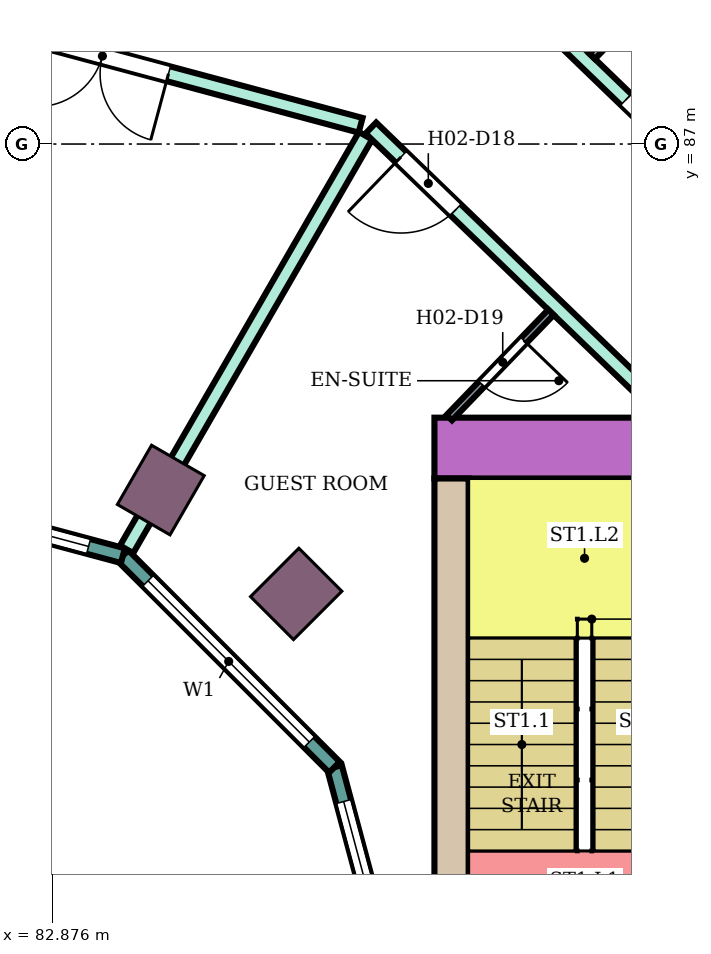
"""IFC4 building model, lengths in metres.
Left out: names, types, materials, properties, quantities, classifications, styles, units other than length and angle.
Written with IfcOpenShell. Run it as: python <this file> out.ifc"""

import sys

from ifc_helpers import new_model, si_unit, direction, frame, frame_2d, origin, origin_2d, place, context, subcontext, project, spatial, rectangle, extrude, element, fill, save


model = new_model("IFC4")
c1 = context("Model", 3, precision=1e-05, world=origin(), true_north=direction((0.0, 1.0)))
c2 = subcontext(c1, "Body", "Model", "MODEL_VIEW")
j1 = project(units=[si_unit("LENGTHUNIT", "METRE"), si_unit("PLANEANGLEUNIT", "RADIAN")], contexts=[c1])
p1 = place(None, origin())
s1 = spatial("IfcSite", under=j1, at=p1, CompositionType="ELEMENT")
p2 = place(p1, origin())
s2 = spatial("IfcBuilding", under=s1, at=p2, CompositionType="ELEMENT")
p3 = place(p2, frame((0.0, 0.0, 40.2)))
s3 = spatial("IfcBuildingStorey", under=s2, at=p3, CompositionType="ELEMENT", Elevation=40.2)
for number, where, z_axis, x_axis in (
    (1, (86.081, 81.081, 0.0), (0.0, 0.0, 1.0), (0.707, 0.707, 0.0)),
    (2, (84.3, 82.448, 0.0), (0.0, 0.0, 1.0), (0.5, 0.866, 0.0)),
):
    element("IfcColumn", number, at=place(p3, frame(where, z_axis=z_axis, x_axis=x_axis)), inside=s3, PredefinedType="COLUMN", context=c2, shape_type="SweptSolid", body=[
        extrude(rectangle(XDim=0.9, YDim=0.8, at=origin_2d()), origin(), (0.0, 0.0, 1.0), 3.8),
    ])
p4 = place(p3, frame((87.9, 83.0, 0.0), z_axis=(0.0, 0.0, 1.0), x_axis=(1.0, 0.0, 0.0)))
e3 = element("IfcWall", 3, at=p4, inside=s3, PredefinedType="SHEAR", context=c2, shape_type="SweptSolid", body=[
    extrude(rectangle(XDim=14.7, YDim=0.8, at=frame_2d((7.35, 0.0))), origin(), (0.0, 0.0, 1.0), 3.48),
])
p5 = place(p4, frame((4.2, 0.0, 0.0)))
e4 = element("IfcOpeningElement", 4, at=p5, cuts=e3, PredefinedType="OPENING", context=c2, shape_type="SweptSolid", body=[
    extrude(rectangle(XDim=2.4, YDim=2.4, at=frame_2d((1.2, 1.2))), frame((0.0, 0.41, 0.0), z_axis=(0.0, -1.0, 0.0), x_axis=(1.0, 0.0, 0.0)), (0.0, 0.0, 1.0), 0.82),
])
p6 = place(p3, frame((88.125, 75.0, 0.0), z_axis=(0.0, 0.0, 1.0), x_axis=(0.0, 1.0, 0.0)))
e5 = element("IfcWall", 5, at=p6, inside=s3, PredefinedType="SHEAR", context=c2, shape_type="SweptSolid", body=[
    extrude(rectangle(XDim=7.6, YDim=0.45, at=frame_2d((3.8, 0.0))), origin(), (0.0, 0.0, 1.0), 3.48),
])
p7 = place(p3, frame((87.604, 75.0, 0.0), z_axis=(0.0, 0.0, 1.0), x_axis=(-0.258789828301, 0.965933654434, 0.0)))
e6 = element("IfcWall", 6, at=p7, inside=s3, PredefinedType="NOTDEFINED", context=c2, shape_type="SweptSolid", body=[
    extrude(rectangle(XDim=3.936, YDim=0.2, at=frame_2d((1.968, 0.0))), origin(), (0.0, 0.0, 1.0), 3.8),
])
p8 = place(p7, frame((0.468, 0.0, 0.9)))
e7 = element("IfcOpeningElement", 7, at=p8, cuts=e6, PredefinedType="OPENING", context=c2, shape_type="SweptSolid", body=[
    extrude(rectangle(XDim=3.0, YDim=2.3, at=frame_2d((1.5, 1.15))), frame((0.0, 0.11, 0.0), z_axis=(0.0, -1.0, 0.0), x_axis=(1.0, 0.0, 0.0)), (0.0, 0.0, 1.0), 0.22),
])
p9 = place(p3, frame((86.585, 78.802, 0.0), z_axis=(0.0, 0.0, 1.0), x_axis=(-0.707106781187, 0.707106781187, 0.0)))
e8 = element("IfcWall", 8, at=p9, inside=s3, PredefinedType="NOTDEFINED", context=c2, shape_type="SweptSolid", body=[
    extrude(rectangle(XDim=3.936, YDim=0.2, at=frame_2d((1.968, 0.0))), origin(), (0.0, 0.0, 1.0), 3.8),
])
p10 = place(p9, frame((0.468, 0.0, 0.9)))
e9 = element("IfcOpeningElement", 9, at=p10, cuts=e8, PredefinedType="OPENING", context=c2, shape_type="SweptSolid", body=[
    extrude(rectangle(XDim=3.0, YDim=2.3, at=frame_2d((1.5, 1.15))), frame((0.0, 0.11, 0.0), z_axis=(0.0, -1.0, 0.0), x_axis=(1.0, 0.0, 0.0)), (0.0, 0.0, 1.0), 0.22),
])
p11 = place(p3, frame((83.802, 81.585, 0.0), z_axis=(0.0, 0.0, 1.0), x_axis=(-0.965933654434, 0.258789828301, 0.0)))
e10 = element("IfcWall", 10, at=p11, inside=s3, PredefinedType="NOTDEFINED", context=c2, shape_type="SweptSolid", body=[
    extrude(rectangle(XDim=3.936, YDim=0.2, at=frame_2d((1.968, 0.0))), origin(), (0.0, 0.0, 1.0), 3.8),
])
p12 = place(p11, frame((0.468, 0.0, 0.9)))
e11 = element("IfcOpeningElement", 11, at=p12, cuts=e10, PredefinedType="OPENING", context=c2, shape_type="SweptSolid", body=[
    extrude(rectangle(XDim=3.0, YDim=2.3, at=frame_2d((1.5, 1.15))), frame((0.0, 0.11, 0.0), z_axis=(0.0, -1.0, 0.0), x_axis=(1.0, 0.0, 0.0)), (0.0, 0.0, 1.0), 0.22),
])
p13 = place(p3, frame((80.0, 89.104, 0.0), z_axis=(0.0, 0.0, 1.0), x_axis=(0.965886659739, -0.258965172444, 0.0)))
e12 = element("IfcWall", 12, at=p13, inside=s3, PredefinedType="PARTITIONING", context=c2, shape_type="SweptSolid", body=[
    extrude(rectangle(XDim=7.173, YDim=0.2, at=frame_2d((3.587, 0.0))), origin(), (0.0, 0.0, 1.0), 3.35),
])
p14 = place(p13, frame((2.757, 0.0, 0.0)))
e13 = element("IfcOpeningElement", 13, at=p14, cuts=e12, PredefinedType="OPENING", context=c2, shape_type="SweptSolid", body=[
    extrude(rectangle(XDim=1.8, YDim=2.1, at=frame_2d((0.9, 1.05))), frame((0.0, 0.11, 0.0), z_axis=(0.0, -1.0, 0.0), x_axis=(1.0, 0.0, 0.0)), (0.0, 0.0, 1.0), 0.22),
])
p15 = place(p3, frame((83.85, 81.668, 0.0), z_axis=(0.0, 0.0, 1.0), x_axis=(0.500233583443, 0.865890502313, 0.0)))
e14 = element("IfcWall", 14, at=p15, inside=s3, PredefinedType="PARTITIONING", context=c2, shape_type="SweptSolid", body=[
    extrude(rectangle(XDim=6.284, YDim=0.2, at=frame_2d((3.142, 0.0))), origin(), (0.0, 0.0, 1.0), 3.35),
])
p16 = place(p3, frame((87.064, 87.211, 0.0), z_axis=(0.0, 0.0, 1.0), x_axis=(0.719540958932, -0.694450004262, 0.0)))
e15 = element("IfcWall", 15, at=p16, inside=s3, PredefinedType="PARTITIONING", context=c2, shape_type="SweptSolid", body=[
    extrude(rectangle(XDim=5.488, YDim=0.2, at=frame_2d((2.744, 0.0))), origin(), (0.0, 0.0, 1.0), 3.35),
])
p17 = place(p16, frame((0.55, 0.0, 0.0)))
e16 = element("IfcOpeningElement", 16, at=p17, cuts=e15, PredefinedType="OPENING", context=c2, shape_type="SweptSolid", body=[
    extrude(rectangle(XDim=1.0, YDim=2.1, at=frame_2d((0.5, 1.05))), frame((0.0, 0.11, 0.0), z_axis=(0.0, -1.0, 0.0), x_axis=(1.0, 0.0, 0.0)), (0.0, 0.0, 1.0), 0.22),
])
p18 = place(p3, frame((88.465, 89.473, 0.0), z_axis=(0.0, 0.0, 1.0), x_axis=(0.719474304909, -0.694519059908, 0.0)))
e17 = element("IfcWall", 17, at=p18, inside=s3, PredefinedType="PARTITIONING", context=c2, shape_type="SweptSolid", body=[
    extrude(rectangle(XDim=6.525, YDim=0.2, at=frame_2d((3.263, 0.0))), origin(), (0.0, 0.0, 1.0), 3.35),
])
p19 = place(p18, frame((2.719, 0.0, 0.0)))
e18 = element("IfcOpeningElement", 18, at=p19, cuts=e17, PredefinedType="OPENING", context=c2, shape_type="SweptSolid", body=[
    extrude(rectangle(XDim=1.0, YDim=2.1, at=frame_2d((0.5, 1.05))), frame((0.0, 0.11, 0.0), z_axis=(0.0, -1.0, 0.0), x_axis=(1.0, 0.0, 0.0)), (0.0, 0.0, 1.0), 0.22),
])
p20 = place(p3, frame((88.095, 83.4, 0.0), z_axis=(0.0, 0.0, 1.0), x_axis=(0.694447472534, 0.719543402368, 0.0)))
e19 = element("IfcWall", 19, at=p20, inside=s3, PredefinedType="PARTITIONING", context=c2, shape_type="SweptSolid", body=[
    extrude(rectangle(XDim=1.926, YDim=0.1, at=frame_2d((0.963, 0.0))), origin(), (0.0, 0.0, 1.0), 3.35),
])
p21 = place(p20, frame((0.613, 0.0, 0.0)))
e20 = element("IfcOpeningElement", 20, at=p21, cuts=e19, PredefinedType="OPENING", context=c2, shape_type="SweptSolid", body=[
    extrude(rectangle(XDim=0.8, YDim=2.1, at=frame_2d((0.4, 1.05))), frame((0.0, 0.06, 0.0), z_axis=(0.0, -1.0, 0.0), x_axis=(1.0, 0.0, 0.0)), (0.0, 0.0, 1.0), 0.12),
])
p22 = place(p3, frame((89.976, 88.154, 0.0), z_axis=(0.0, 0.0, 1.0), x_axis=(0.6945137956, 0.719479386585, 0.0)))
e21 = element("IfcWall", 21, at=p22, inside=s3, PredefinedType="PARTITIONING", context=c2, shape_type="SweptSolid", body=[
    extrude(rectangle(XDim=2.699, YDim=0.1, at=frame_2d((1.35, 0.0))), origin(), (0.0, 0.0, 1.0), 3.35),
])
p23 = place(p22, frame((0.9, 0.0, 0.0)))
e22 = element("IfcOpeningElement", 22, at=p23, cuts=e21, PredefinedType="OPENING", context=c2, shape_type="SweptSolid", body=[
    extrude(rectangle(XDim=0.8, YDim=2.1, at=frame_2d((0.4, 1.05))), frame((0.0, 0.06, 0.0), z_axis=(0.0, -1.0, 0.0), x_axis=(1.0, 0.0, 0.0)), (0.0, 0.0, 1.0), 0.12),
])
p24 = place(p8, origin())
e23 = element("IfcWindow", 23, at=p24, inside=s3, PartitioningType="SINGLE_PANEL", PredefinedType="WINDOW", context=c2, shape_type="SweptSolid", body=[
    extrude(rectangle(XDim=3.0, YDim=2.3, at=frame_2d((1.5, 1.15))), frame((0.0, 0.03, 0.0), z_axis=(0.0, -1.0, 0.0), x_axis=(1.0, 0.0, 0.0)), (0.0, 0.0, 1.0), 0.06),
])
fill(e7, e23)
p25 = place(p10, origin())
e24 = element("IfcWindow", 24, at=p25, inside=s3, PartitioningType="SINGLE_PANEL", PredefinedType="WINDOW", context=c2, shape_type="SweptSolid", body=[
    extrude(rectangle(XDim=3.0, YDim=2.3, at=frame_2d((1.5, 1.15))), frame((0.0, 0.03, 0.0), z_axis=(0.0, -1.0, 0.0), x_axis=(1.0, 0.0, 0.0)), (0.0, 0.0, 1.0), 0.06),
])
fill(e9, e24)
p26 = place(p12, origin())
e25 = element("IfcWindow", 25, at=p26, inside=s3, PartitioningType="SINGLE_PANEL", PredefinedType="WINDOW", context=c2, shape_type="SweptSolid", body=[
    extrude(rectangle(XDim=3.0, YDim=2.3, at=frame_2d((1.5, 1.15))), frame((0.0, 0.03, 0.0), z_axis=(0.0, -1.0, 0.0), x_axis=(1.0, 0.0, 0.0)), (0.0, 0.0, 1.0), 0.06),
])
fill(e11, e25)
p27 = place(p19, origin())
e26 = element("IfcDoor", 26, at=p27, inside=s3, OperationType="SINGLE_SWING_RIGHT", PredefinedType="DOOR", context=c2, shape_type="SweptSolid", body=[
    extrude(rectangle(XDim=1.0, YDim=2.1, at=frame_2d((0.5, 1.05))), frame((0.0, 0.025, 0.0), z_axis=(0.0, -1.0, 0.0), x_axis=(1.0, 0.0, 0.0)), (0.0, 0.0, 1.0), 0.05),
])
fill(e18, e26)
p28 = place(p17, frame((1.0, 0.0, 0.0), z_axis=(0.0, 0.0, 1.0), x_axis=(-1.0, 0.0, 0.0)))
e27 = element("IfcDoor", 27, at=p28, inside=s3, OperationType="SINGLE_SWING_RIGHT", PredefinedType="DOOR", context=c2, shape_type="SweptSolid", body=[
    extrude(rectangle(XDim=1.0, YDim=2.1, at=frame_2d((0.5, 1.05))), frame((0.0, 0.025, 0.0), z_axis=(0.0, -1.0, 0.0), x_axis=(1.0, 0.0, 0.0)), (0.0, 0.0, 1.0), 0.05),
])
fill(e16, e27)
p29 = place(p21, frame((0.8, 0.0, 0.0), z_axis=(0.0, 0.0, 1.0), x_axis=(-1.0, 0.0, 0.0)))
e28 = element("IfcDoor", 28, at=p29, inside=s3, OperationType="SINGLE_SWING_LEFT", PredefinedType="DOOR", context=c2, shape_type="SweptSolid", body=[
    extrude(rectangle(XDim=0.8, YDim=2.1, at=frame_2d((0.4, 1.05))), frame((0.0, 0.025, 0.0), z_axis=(0.0, -1.0, 0.0), x_axis=(1.0, 0.0, 0.0)), (0.0, 0.0, 1.0), 0.05),
])
fill(e20, e28)
p30 = place(p14, frame((1.8, 0.0, 0.0), z_axis=(0.0, 0.0, 1.0), x_axis=(-1.0, 0.0, 0.0)))
e29 = element("IfcDoor", 29, at=p30, inside=s3, OperationType="DOUBLE_DOOR_SINGLE_SWING", PredefinedType="DOOR", context=c2, shape_type="SweptSolid", body=[
    extrude(rectangle(XDim=1.8, YDim=2.1, at=frame_2d((0.9, 1.05))), frame((0.0, 0.025, 0.0), z_axis=(0.0, -1.0, 0.0), x_axis=(1.0, 0.0, 0.0)), (0.0, 0.0, 1.0), 0.05),
])
fill(e13, e29)
save(model, sys.argv[1])
